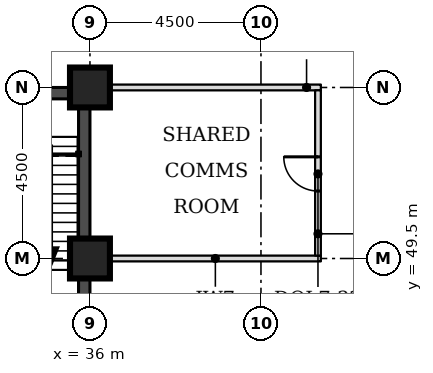
"""IFC4 building model, lengths in metres.
Left out: names, types, materials, properties, quantities, classifications, styles, units other than length and angle.
Written with IfcOpenShell. Run it as: python <this file> out.ifc"""

import sys

from ifc_helpers import new_model, si_unit, direction, frame, frame_2d, origin, origin_2d, place, context, subcontext, project, spatial, rectangle, extrude, element, fill, save


model = new_model("IFC4")
c1 = context("Model", 3, precision=1e-05, world=origin(), true_north=direction((0.0, 1.0)))
c2 = subcontext(c1, "Body", "Model", "MODEL_VIEW")
j1 = project(units=[si_unit("LENGTHUNIT", "METRE"), si_unit("PLANEANGLEUNIT", "RADIAN")], contexts=[c1])
p1 = place(None, origin())
s1 = spatial("IfcSite", under=j1, at=p1, CompositionType="ELEMENT")
p2 = place(p1, origin())
s2 = spatial("IfcBuilding", under=s1, at=p2, CompositionType="ELEMENT")
p3 = place(p2, frame((0.0, 0.0, 130.7)))
s3 = spatial("IfcBuildingStorey", under=s2, at=p3, CompositionType="ELEMENT", Elevation=130.7)
for number, where, z_axis, x_axis in (
    (1, (36.0, 49.5, 0.0), (0.0, 0.0, 1.0), (1.0, 0.0, 0.0)),
    (2, (36.0, 54.0, 0.0), (0.0, 0.0, 1.0), (1.0, 0.0, 0.0)),
):
    element("IfcColumn", number, at=place(p3, frame(where, z_axis=z_axis, x_axis=x_axis)), inside=s3, PredefinedType="COLUMN", context=c2, shape_type="SweptSolid", body=[
        extrude(rectangle(XDim=1.05, YDim=1.05, at=origin_2d()), origin(), (0.0, 0.0, 1.0), 3.7),
    ])
p4 = place(p3, frame((27.3, 53.85, 0.0), z_axis=(0.0, 0.0, 1.0), x_axis=(1.0, 0.0, 0.0)))
e3 = element("IfcWall", 3, at=p4, inside=s3, PredefinedType="SHEAR", context=c2, shape_type="SweptSolid", body=[
    extrude(rectangle(XDim=8.4, YDim=0.3, at=frame_2d((4.2, 0.0))), origin(), (0.0, 0.0, 1.0), 3.7),
])
p5 = place(p4, frame((6.4, 0.0, 0.0)))
e4 = element("IfcOpeningElement", 4, at=p5, cuts=e3, PredefinedType="OPENING", context=c2, shape_type="SweptSolid", body=[
    extrude(rectangle(XDim=1.1, YDim=2.1, at=frame_2d((0.55, 1.05))), frame((0.0, 0.16, 0.0), z_axis=(0.0, -1.0, 0.0), x_axis=(1.0, 0.0, 0.0)), (0.0, 0.0, 1.0), 0.32),
])
p6 = place(p3, frame((35.85, 45.0, 0.0), z_axis=(0.0, 0.0, 1.0), x_axis=(0.0, 1.0, 0.0)))
e5 = element("IfcWall", 5, at=p6, inside=s3, PredefinedType="SHEAR", context=c2, shape_type="SweptSolid", body=[
    extrude(rectangle(XDim=9.0, YDim=0.3, at=frame_2d((4.5, 0.0))), origin(), (0.0, 0.0, 1.0), 3.7),
])
for number, where, z_axis, x_axis in (
    (6, (36.525, 49.5, 0.0), (0.0, 0.0, 1.0), (1.0, 0.0, 0.0)),
    (7, (36.525, 54.0, 0.0), (0.0, 0.0, 1.0), (1.0, 0.0, 0.0)),
):
    element("IfcWall", number, at=place(p3, frame(where, z_axis=z_axis, x_axis=x_axis)), inside=s3, PredefinedType="PARTITIONING", context=c2, shape_type="SweptSolid", body=[
        extrude(rectangle(XDim=5.55, YDim=0.15, at=frame_2d((2.775, 0.0))), origin(), (0.0, 0.0, 1.0), 3.55),
    ])
p7 = place(p3, frame((42.0, 49.575, 0.0), z_axis=(0.0, 0.0, 1.0), x_axis=(0.0, 1.0, 0.0)))
e8 = element("IfcWall", 8, at=p7, inside=s3, PredefinedType="PARTITIONING", context=c2, shape_type="SweptSolid", body=[
    extrude(rectangle(XDim=4.35, YDim=0.15, at=frame_2d((2.175, 0.0))), origin(), (0.0, 0.0, 1.0), 3.55),
])
p8 = place(p7, frame((1.7, 0.0, 0.0)))
e9 = element("IfcOpeningElement", 9, at=p8, cuts=e8, PredefinedType="OPENING", context=c2, shape_type="SweptSolid", body=[
    extrude(rectangle(XDim=0.9, YDim=2.1, at=frame_2d((0.45, 1.05))), frame((0.0, 0.085, 0.0), z_axis=(0.0, -1.0, 0.0), x_axis=(1.0, 0.0, 0.0)), (0.0, 0.0, 1.0), 0.17),
])
p9 = place(p8, origin())
e10 = element("IfcDoor", 10, at=p9, inside=s3, OperationType="SINGLE_SWING_RIGHT", PredefinedType="DOOR", context=c2, shape_type="SweptSolid", body=[
    extrude(rectangle(XDim=0.9, YDim=2.1, at=frame_2d((0.45, 1.05))), frame((0.0, 0.025, 0.0), z_axis=(0.0, -1.0, 0.0), x_axis=(1.0, 0.0, 0.0)), (0.0, 0.0, 1.0), 0.05),
])
fill(e9, e10)
save(model, sys.argv[1])
